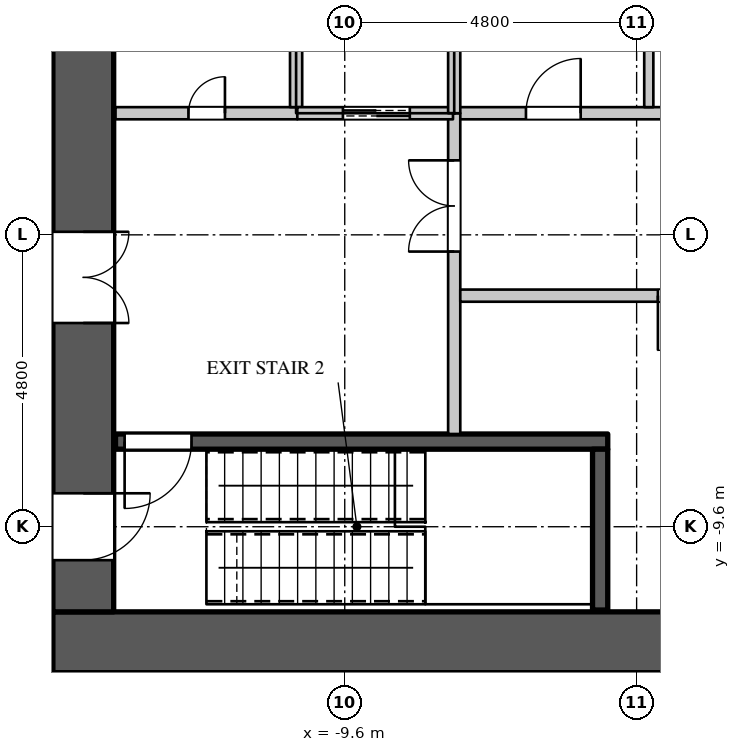
"""IFC4 building model, lengths in metres.
Left out: names, types, materials, properties, quantities, classifications, styles, units other than length and angle.
Written with IfcOpenShell. Run it as: python <this file> out.ifc"""

import sys

from ifc_helpers import new_model, si_unit, direction, frame, frame_2d, origin, place, context, subcontext, project, spatial, rectangle, extrude, element, fill, save


model = new_model("IFC4")
c1 = context("Model", 3, precision=1e-05, world=origin(), true_north=direction((0.0, 1.0)))
c2 = subcontext(c1, "Body", "Model", "MODEL_VIEW")
j1 = project(units=[si_unit("LENGTHUNIT", "METRE"), si_unit("PLANEANGLEUNIT", "RADIAN")], contexts=[c1])
p1 = place(None, origin())
s1 = spatial("IfcSite", under=j1, at=p1, CompositionType="ELEMENT")
p2 = place(p1, origin())
s2 = spatial("IfcBuilding", under=s1, at=p2, CompositionType="ELEMENT")
p3 = place(p2, frame((0.0, 0.0, 25.5)))
s3 = spatial("IfcBuildingStorey", under=s2, at=p3, CompositionType="ELEMENT", Elevation=25.5)
p4 = place(p3, frame((-14.4, -11.5, 0.0), z_axis=(0.0, 0.0, 1.0), x_axis=(1.0, 0.0, 0.0)))
e1 = element("IfcWall", 1, at=p4, inside=s3, PredefinedType="SHEAR", context=c2, shape_type="SweptSolid", body=[
    extrude(rectangle(XDim=28.8, YDim=1.0, at=frame_2d((14.4, 0.0))), origin(), (0.0, 0.0, 1.0), 4.2),
])
p5 = place(p3, frame((-13.9, -11.0, 0.0), z_axis=(0.0, 0.0, 1.0), x_axis=(0.0, 1.0, 0.0)))
e2 = element("IfcWall", 2, at=p5, inside=s3, PredefinedType="SHEAR", context=c2, shape_type="SweptSolid", body=[
    extrude(rectangle(XDim=22.0, YDim=1.0, at=frame_2d((11.0, 0.0))), origin(), (0.0, 0.0, 1.0), 4.2),
])
p6 = place(p5, frame((20.05, 0.0, 0.0)))
e3 = element("IfcOpeningElement", 3, at=p6, cuts=e2, PredefinedType="OPENING", context=c2, shape_type="SweptSolid", body=[
    extrude(rectangle(XDim=1.1, YDim=2.2, at=frame_2d((0.55, 1.1))), frame((0.0, 0.51, 0.0), z_axis=(0.0, -1.0, 0.0), x_axis=(1.0, 0.0, 0.0)), (0.0, 0.0, 1.0), 1.02),
])
p7 = place(p5, frame((0.85, 0.0, 0.0)))
e4 = element("IfcOpeningElement", 4, at=p7, cuts=e2, PredefinedType="OPENING", context=c2, shape_type="SweptSolid", body=[
    extrude(rectangle(XDim=1.1, YDim=2.2, at=frame_2d((0.55, 1.1))), frame((0.0, 0.51, 0.0), z_axis=(0.0, -1.0, 0.0), x_axis=(1.0, 0.0, 0.0)), (0.0, 0.0, 1.0), 1.02),
])
p8 = place(p5, frame((15.75, 0.0, 0.0)))
e5 = element("IfcOpeningElement", 5, at=p8, cuts=e2, PredefinedType="OPENING", context=c2, shape_type="SweptSolid", body=[
    extrude(rectangle(XDim=1.5, YDim=2.4, at=frame_2d((0.75, 1.2))), frame((0.0, 0.51, 0.0), z_axis=(0.0, -1.0, 0.0), x_axis=(1.0, 0.0, 0.0)), (0.0, 0.0, 1.0), 1.02),
])
p9 = place(p5, frame((4.75, 0.0, 0.0)))
e6 = element("IfcOpeningElement", 6, at=p9, cuts=e2, PredefinedType="OPENING", context=c2, shape_type="SweptSolid", body=[
    extrude(rectangle(XDim=1.5, YDim=2.4, at=frame_2d((0.75, 1.2))), frame((0.0, 0.51, 0.0), z_axis=(0.0, -1.0, 0.0), x_axis=(1.0, 0.0, 0.0)), (0.0, 0.0, 1.0), 1.02),
])
p10 = place(p3, frame((-7.82, -2.8, 0.0), z_axis=(0.0, 0.0, 1.0), x_axis=(1.0, 0.0, 0.0)))
e7 = element("IfcWall", 7, at=p10, inside=s3, PredefinedType="PARTITIONING", context=c2, shape_type="SweptSolid", body=[
    extrude(rectangle(XDim=15.64, YDim=0.2, at=frame_2d((7.82, 0.0))), origin(), (0.0, 0.0, 1.0), 3.95),
])
p11 = place(p10, frame((1.2, 0.0, 0.0)))
e8 = element("IfcOpeningElement", 8, at=p11, cuts=e7, PredefinedType="OPENING", context=c2, shape_type="SweptSolid", body=[
    extrude(rectangle(XDim=0.9, YDim=2.2, at=frame_2d((0.45, 1.1))), frame((0.0, 0.11, 0.0), z_axis=(0.0, -1.0, 0.0), x_axis=(1.0, 0.0, 0.0)), (0.0, 0.0, 1.0), 0.22),
])
p12 = place(p10, frame((4.7, 0.0, 0.0)))
e9 = element("IfcOpeningElement", 9, at=p12, cuts=e7, PredefinedType="OPENING", context=c2, shape_type="SweptSolid", body=[
    extrude(rectangle(XDim=0.9, YDim=2.2, at=frame_2d((0.45, 1.1))), frame((0.0, 0.11, 0.0), z_axis=(0.0, -1.0, 0.0), x_axis=(1.0, 0.0, 0.0)), (0.0, 0.0, 1.0), 0.22),
])
p13 = place(p10, frame((7.75, 0.0, 0.0)))
e10 = element("IfcOpeningElement", 10, at=p13, cuts=e7, PredefinedType="OPENING", context=c2, shape_type="SweptSolid", body=[
    extrude(rectangle(XDim=0.9, YDim=2.2, at=frame_2d((0.45, 1.1))), frame((0.0, 0.11, 0.0), z_axis=(0.0, -1.0, 0.0), x_axis=(1.0, 0.0, 0.0)), (0.0, 0.0, 1.0), 0.22),
])
p14 = place(p10, frame((10.3, 0.0, 0.0)))
e11 = element("IfcOpeningElement", 11, at=p14, cuts=e7, PredefinedType="OPENING", context=c2, shape_type="SweptSolid", body=[
    extrude(rectangle(XDim=0.9, YDim=2.2, at=frame_2d((0.45, 1.1))), frame((0.0, 0.11, 0.0), z_axis=(0.0, -1.0, 0.0), x_axis=(1.0, 0.0, 0.0)), (0.0, 0.0, 1.0), 0.22),
])
p15 = place(p10, frame((13.3, 0.0, 0.0)))
e12 = element("IfcOpeningElement", 12, at=p15, cuts=e7, PredefinedType="OPENING", context=c2, shape_type="SweptSolid", body=[
    extrude(rectangle(XDim=0.9, YDim=2.2, at=frame_2d((0.45, 1.1))), frame((0.0, 0.11, 0.0), z_axis=(0.0, -1.0, 0.0), x_axis=(1.0, 0.0, 0.0)), (0.0, 0.0, 1.0), 0.22),
])
p16 = place(p3, frame((-7.8, -8.075, 0.0), z_axis=(0.0, 0.0, 1.0), x_axis=(0.0, 1.0, 0.0)))
e13 = element("IfcWall", 13, at=p16, inside=s3, PredefinedType="PARTITIONING", context=c2, shape_type="SweptSolid", body=[
    extrude(rectangle(XDim=5.275, YDim=0.2, at=frame_2d((2.637, 0.0))), origin(), (0.0, 0.0, 1.0), 3.95),
])
p17 = place(p16, frame((3.0, 0.0, 0.0)))
e14 = element("IfcOpeningElement", 14, at=p17, cuts=e13, PredefinedType="OPENING", context=c2, shape_type="SweptSolid", body=[
    extrude(rectangle(XDim=1.5, YDim=2.4, at=frame_2d((0.75, 1.2))), frame((0.0, 0.11, 0.0), z_axis=(0.0, -1.0, 0.0), x_axis=(1.0, 0.0, 0.0)), (0.0, 0.0, 1.0), 0.22),
])
p18 = place(p3, frame((-7.7, -5.8, 0.0), z_axis=(0.0, 0.0, 1.0), x_axis=(1.0, 0.0, 0.0)))
e15 = element("IfcWall", 15, at=p18, inside=s3, PredefinedType="PARTITIONING", context=c2, shape_type="SweptSolid", body=[
    extrude(rectangle(XDim=21.07, YDim=0.2, at=frame_2d((10.535, 0.0))), origin(), (0.0, 0.0, 1.0), 3.95),
])
p19 = place(p18, frame((3.25, 0.0, 0.0)))
e16 = element("IfcOpeningElement", 16, at=p19, cuts=e15, PredefinedType="OPENING", context=c2, shape_type="SweptSolid", body=[
    extrude(rectangle(XDim=0.9, YDim=2.2, at=frame_2d((0.45, 1.1))), frame((0.0, 0.11, 0.0), z_axis=(0.0, -1.0, 0.0), x_axis=(1.0, 0.0, 0.0)), (0.0, 0.0, 1.0), 0.22),
])
p20 = place(p18, frame((11.2, 0.0, 0.0)))
e17 = element("IfcOpeningElement", 17, at=p20, cuts=e15, PredefinedType="OPENING", context=c2, shape_type="SweptSolid", body=[
    extrude(rectangle(XDim=0.9, YDim=2.2, at=frame_2d((0.45, 1.1))), frame((0.0, 0.11, 0.0), z_axis=(0.0, -1.0, 0.0), x_axis=(1.0, 0.0, 0.0)), (0.0, 0.0, 1.0), 0.22),
])
p21 = place(p18, frame((18.05, 0.0, 0.0)))
e18 = element("IfcOpeningElement", 18, at=p21, cuts=e15, PredefinedType="OPENING", context=c2, shape_type="SweptSolid", body=[
    extrude(rectangle(XDim=0.9, YDim=2.2, at=frame_2d((0.45, 1.1))), frame((0.0, 0.11, 0.0), z_axis=(0.0, -1.0, 0.0), x_axis=(1.0, 0.0, 0.0)), (0.0, 0.0, 1.0), 0.22),
])
p22 = place(p3, frame((-4.6, -2.7, 0.0), z_axis=(0.0, 0.0, 1.0), x_axis=(0.0, 1.0, 0.0)))
e19 = element("IfcWall", 19, at=p22, inside=s3, PredefinedType="PARTITIONING", context=c2, shape_type="SweptSolid", body=[
    extrude(rectangle(XDim=2.6, YDim=0.15, at=frame_2d((1.3, 0.0))), origin(), (0.0, 0.0, 1.0), 3.95),
])
p23 = place(p3, frame((-13.37, -2.8, 0.0), z_axis=(0.0, 0.0, 1.0), x_axis=(1.0, 0.0, 0.0)))
e20 = element("IfcWall", 20, at=p23, inside=s3, PredefinedType="PARTITIONING", context=c2, shape_type="SweptSolid", body=[
    extrude(rectangle(XDim=2.99, YDim=0.2, at=frame_2d((1.495, 0.0))), origin(), (0.0, 0.0, 1.0), 3.95),
])
p24 = place(p23, frame((1.2, 0.0, 0.0)))
e21 = element("IfcOpeningElement", 21, at=p24, cuts=e20, PredefinedType="OPENING", context=c2, shape_type="SweptSolid", body=[
    extrude(rectangle(XDim=0.6, YDim=2.0, at=frame_2d((0.3, 1.0))), frame((0.0, 0.11, 0.0), z_axis=(0.0, -1.0, 0.0), x_axis=(1.0, 0.0, 0.0)), (0.0, 0.0, 1.0), 0.22),
])
p25 = place(p3, frame((-10.4, -2.7, 0.0), z_axis=(0.0, 0.0, 1.0), x_axis=(0.0, 1.0, 0.0)))
e22 = element("IfcWall", 22, at=p25, inside=s3, PredefinedType="PARTITIONING", context=c2, shape_type="SweptSolid", body=[
    extrude(rectangle(XDim=2.7, YDim=0.2, at=frame_2d((1.35, 0.0))), origin(), (0.0, 0.0, 1.0), 3.95),
])
p26 = place(p3, frame((-10.38, -2.8, 0.0), z_axis=(0.0, 0.0, 1.0), x_axis=(1.0, 0.0, 0.0)))
e23 = element("IfcWall", 23, at=p26, inside=s3, PredefinedType="PARTITIONING", context=c2, shape_type="SweptSolid", body=[
    extrude(rectangle(XDim=2.56, YDim=0.2, at=frame_2d((1.28, 0.0))), origin(), (0.0, 0.0, 1.0), 3.95),
])
p27 = place(p26, frame((0.75, 0.0, 0.0)))
e24 = element("IfcOpeningElement", 24, at=p27, cuts=e23, PredefinedType="OPENING", context=c2, shape_type="SweptSolid", body=[
    extrude(rectangle(XDim=1.1, YDim=2.2, at=frame_2d((0.55, 1.1))), frame((0.0, 0.11, 0.0), z_axis=(0.0, -1.0, 0.0), x_axis=(1.0, 0.0, 0.0)), (0.0, 0.0, 1.0), 0.22),
])
p28 = place(p3, frame((-7.8, -2.8, 0.0), z_axis=(0.0, 0.0, 1.0), x_axis=(0.0, 1.0, 0.0)))
e25 = element("IfcWall", 25, at=p28, inside=s3, PredefinedType="PARTITIONING", context=c2, shape_type="SweptSolid", body=[
    extrude(rectangle(XDim=2.8, YDim=0.2, at=frame_2d((1.4, 0.0))), origin(), (0.0, 0.0, 1.0), 3.95),
])
p29 = place(p3, frame((-13.37, -8.2, 0.0), z_axis=(0.0, 0.0, 1.0), x_axis=(1.0, 0.0, 0.0)))
e26 = element("IfcWall", 26, at=p29, inside=s3, PredefinedType="SHEAR", context=c2, shape_type="SweptSolid", body=[
    extrude(rectangle(XDim=8.095, YDim=0.25, at=frame_2d((4.048, 0.0))), origin(), (0.0, 0.0, 1.0), 3.95),
])
p30 = place(p29, frame((0.15, 0.0, 0.0)))
e27 = element("IfcOpeningElement", 27, at=p30, cuts=e26, PredefinedType="OPENING", context=c2, shape_type="SweptSolid", body=[
    extrude(rectangle(XDim=1.1, YDim=2.2, at=frame_2d((0.55, 1.1))), frame((0.0, 0.135, 0.0), z_axis=(0.0, -1.0, 0.0), x_axis=(1.0, 0.0, 0.0)), (0.0, 0.0, 1.0), 0.27),
])
p31 = place(p3, frame((-5.4, -10.97, 0.0), z_axis=(0.0, 0.0, 1.0), x_axis=(0.0, 1.0, 0.0)))
e28 = element("IfcWall", 28, at=p31, inside=s3, PredefinedType="SHEAR", context=c2, shape_type="SweptSolid", body=[
    extrude(rectangle(XDim=2.645, YDim=0.25, at=frame_2d((1.323, 0.0))), origin(), (0.0, 0.0, 1.0), 3.95),
])
p32 = place(p24, origin())
e29 = element("IfcDoor", 29, at=p32, inside=s3, OperationType="SINGLE_SWING_RIGHT", PredefinedType="DOOR", context=c2, shape_type="SweptSolid", body=[
    extrude(rectangle(XDim=0.6, YDim=2.0, at=frame_2d((0.3, 1.0))), frame((0.0, 0.025, 0.0), z_axis=(0.0, -1.0, 0.0), x_axis=(1.0, 0.0, 0.0)), (0.0, 0.0, 1.0), 0.05),
])
fill(e21, e29)
p33 = place(p19, origin())
e30 = element("IfcDoor", 30, at=p33, inside=s3, OperationType="SINGLE_SWING_RIGHT", PredefinedType="DOOR", context=c2, shape_type="SweptSolid", body=[
    extrude(rectangle(XDim=0.9, YDim=2.2, at=frame_2d((0.45, 1.1))), frame((0.0, 0.025, 0.0), z_axis=(0.0, -1.0, 0.0), x_axis=(1.0, 0.0, 0.0)), (0.0, 0.0, 1.0), 0.05),
])
fill(e16, e30)
p34 = place(p11, origin())
e31 = element("IfcDoor", 31, at=p34, inside=s3, OperationType="SINGLE_SWING_RIGHT", PredefinedType="DOOR", context=c2, shape_type="SweptSolid", body=[
    extrude(rectangle(XDim=0.9, YDim=2.2, at=frame_2d((0.45, 1.1))), frame((0.0, 0.025, 0.0), z_axis=(0.0, -1.0, 0.0), x_axis=(1.0, 0.0, 0.0)), (0.0, 0.0, 1.0), 0.05),
])
fill(e8, e31)
p35 = place(p27, origin())
e32 = element("IfcDoor", 32, at=p35, inside=s3, OperationType="DOUBLE_DOOR_SLIDING", PredefinedType="DOOR", context=c2, shape_type="SweptSolid", body=[
    extrude(rectangle(XDim=1.1, YDim=2.2, at=frame_2d((0.55, 1.1))), frame((0.0, 0.025, 0.0), z_axis=(0.0, -1.0, 0.0), x_axis=(1.0, 0.0, 0.0)), (0.0, 0.0, 1.0), 0.05),
])
fill(e24, e32)
p36 = place(p30, origin())
e33 = element("IfcDoor", 33, at=p36, inside=s3, OperationType="SINGLE_SWING_RIGHT", PredefinedType="DOOR", context=c2, shape_type="SweptSolid", body=[
    extrude(rectangle(XDim=1.1, YDim=2.2, at=frame_2d((0.55, 1.1))), frame((0.0, 0.025, 0.0), z_axis=(0.0, -1.0, 0.0), x_axis=(1.0, 0.0, 0.0)), (0.0, 0.0, 1.0), 0.05),
])
fill(e27, e33)
p37 = place(p17, origin())
e34 = element("IfcDoor", 34, at=p37, inside=s3, OperationType="DOUBLE_DOOR_SINGLE_SWING", PredefinedType="DOOR", context=c2, shape_type="SweptSolid", body=[
    extrude(rectangle(XDim=1.5, YDim=2.4, at=frame_2d((0.75, 1.2))), frame((0.0, 0.025, 0.0), z_axis=(0.0, -1.0, 0.0), x_axis=(1.0, 0.0, 0.0)), (0.0, 0.0, 1.0), 0.05),
])
fill(e14, e34)
p38 = place(p7, origin())
e35 = element("IfcDoor", 35, at=p38, inside=s3, OperationType="SINGLE_SWING_LEFT", PredefinedType="DOOR", context=c2, shape_type="SweptSolid", body=[
    extrude(rectangle(XDim=1.1, YDim=2.2, at=frame_2d((0.55, 1.1))), frame((0.0, -0.445, 0.0), z_axis=(0.0, -1.0, 0.0), x_axis=(1.0, 0.0, 0.0)), (0.0, 0.0, 1.0), 0.05),
])
fill(e4, e35)
p39 = place(p9, origin())
e36 = element("IfcDoor", 36, at=p39, inside=s3, OperationType="DOUBLE_DOOR_SINGLE_SWING", PredefinedType="DOOR", context=c2, shape_type="SweptSolid", body=[
    extrude(rectangle(XDim=1.5, YDim=2.4, at=frame_2d((0.75, 1.2))), frame((0.0, -0.445, 0.0), z_axis=(0.0, -1.0, 0.0), x_axis=(1.0, 0.0, 0.0)), (0.0, 0.0, 1.0), 0.05),
])
fill(e6, e36)
save(model, sys.argv[1])
